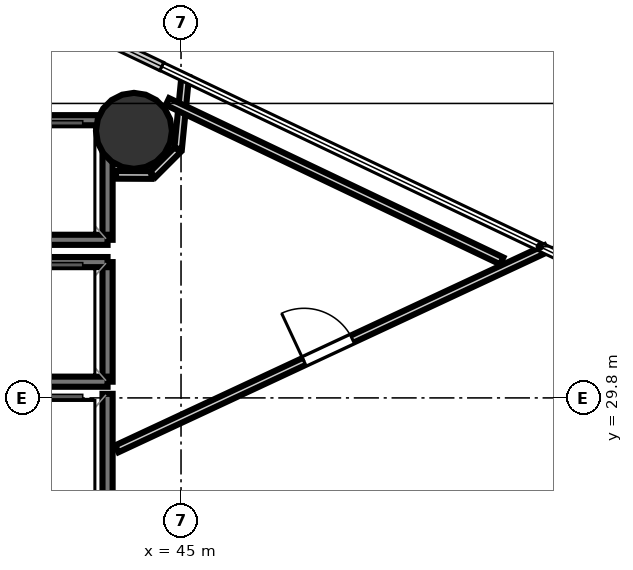
"""IFC4 building model, lengths in metres.
Left out: names, types, materials, properties, quantities, classifications, styles, units other than length and angle.
Written with IfcOpenShell. Run it as: python <this file> out.ifc"""

import sys

from ifc_helpers import new_model, si_unit, direction, frame, frame_2d, origin, origin_2d, place, context, subcontext, project, spatial, rectangle, hollow_circle, extrude, element, fill, save


model = new_model("IFC4")
c1 = context("Model", 3, precision=1e-05, world=origin(), true_north=direction((0.0, 1.0)))
c2 = subcontext(c1, "Body", "Model", "MODEL_VIEW")
j1 = project(units=[si_unit("LENGTHUNIT", "METRE"), si_unit("PLANEANGLEUNIT", "RADIAN")], contexts=[c1])
p1 = place(None, origin())
s1 = spatial("IfcSite", under=j1, at=p1, CompositionType="ELEMENT")
p2 = place(p1, origin())
s2 = spatial("IfcBuilding", under=s1, at=p2, CompositionType="ELEMENT")
p3 = place(p2, frame((0.0, 0.0, 138.5)))
s3 = spatial("IfcBuildingStorey", under=s2, at=p3, CompositionType="ELEMENT", Elevation=138.5)
p4 = place(p3, frame((44.071, 35.07, 0.0), z_axis=(0.0, 0.0, 1.0), x_axis=(1.0, 0.0, 0.0)))
e1 = element("IfcColumn", 1, at=p4, inside=s3, PredefinedType="COLUMN", context=c2, shape_type="SweptSolid", body=[
    extrude(hollow_circle(Radius=0.75, WallThickness=0.036, at=origin_2d()), origin(), (0.0, 0.0, 1.0), 4.6),
])
p5 = place(p3, frame((43.55, 30.12, 0.0), z_axis=(0.0, 0.0, 1.0), x_axis=(0.0, 1.0, 0.0)))
e2 = element("IfcWall", 2, at=p5, inside=s3, PredefinedType="SOLIDWALL", context=c2, shape_type="SweptSolid", body=[
    extrude(rectangle(XDim=2.36, YDim=0.2, at=frame_2d((1.18, 0.0))), origin(), (0.0, 0.0, 1.0), 4.38),
])
for number, where, z_axis, x_axis in (
    (3, (41.45, 32.48, 0.0), (0.0, 0.0, 1.0), (1.0, 0.0, 0.0)),
    (4, (41.45, 30.12, 0.0), (0.0, 0.0, 1.0), (1.0, 0.0, 0.0)),
):
    element("IfcWall", number, at=place(p3, frame(where, z_axis=z_axis, x_axis=x_axis)), inside=s3, PredefinedType="SOLIDWALL", context=c2, shape_type="SweptSolid", body=[
        extrude(rectangle(XDim=2.1, YDim=0.2, at=frame_2d((1.05, 0.0))), origin(), (0.0, 0.0, 1.0), 4.38),
    ])
p6 = place(p3, frame((43.55, 27.52, 0.0), z_axis=(0.0, 0.0, 1.0), x_axis=(0.0, 1.0, 0.0)))
e5 = element("IfcWall", 5, at=p6, inside=s3, PredefinedType="SOLIDWALL", context=c2, shape_type="SweptSolid", body=[
    extrude(rectangle(XDim=2.36, YDim=0.2, at=frame_2d((1.18, 0.0))), origin(), (0.0, 0.0, 1.0), 4.38),
])
p7 = place(p3, frame((43.55, 32.92, 0.0), z_axis=(0.0, 0.0, 1.0), x_axis=(0.0, 1.0, 0.0)))
e6 = element("IfcWall", 6, at=p7, inside=s3, PredefinedType="SOLIDWALL", context=c2, shape_type="SweptSolid", body=[
    extrude(rectangle(XDim=2.36, YDim=0.2, at=frame_2d((1.18, 0.0))), origin(), (0.0, 0.0, 1.0), 4.38),
])
for number, where, z_axis, x_axis in (
    (7, (41.45, 35.28, 0.0), (0.0, 0.0, 1.0), (1.0, 0.0, 0.0)),
    (8, (41.45, 32.92, 0.0), (0.0, 0.0, 1.0), (1.0, 0.0, 0.0)),
):
    element("IfcWall", number, at=place(p3, frame(where, z_axis=z_axis, x_axis=x_axis)), inside=s3, PredefinedType="SOLIDWALL", context=c2, shape_type="SweptSolid", body=[
        extrude(rectangle(XDim=2.1, YDim=0.2, at=frame_2d((1.05, 0.0))), origin(), (0.0, 0.0, 1.0), 4.38),
    ])
p8 = place(p3, frame((43.733, 28.795, 0.0), z_axis=(0.0, 0.0, 1.0), x_axis=(0.906305922987, 0.422622259184, 0.0)))
e9 = element("IfcWall", 9, at=p8, inside=s3, PredefinedType="PARTITIONING", context=c2, shape_type="SweptSolid", body=[
    extrude(rectangle(XDim=9.344, YDim=0.15, at=frame_2d((4.672, 0.0))), origin(), (0.0, 0.0, 1.0), 2.9),
])
p9 = place(p8, frame((4.078, 0.0, 0.0)))
e10 = element("IfcOpeningElement", 10, at=p9, cuts=e9, PredefinedType="OPENING", context=c2, shape_type="SweptSolid", body=[
    extrude(rectangle(XDim=1.05, YDim=2.15, at=frame_2d((0.525, 1.075))), frame((0.0, 0.085, 0.0), z_axis=(0.0, -1.0, 0.0), x_axis=(1.0, 0.0, 0.0)), (0.0, 0.0, 1.0), 0.17),
])
p10 = place(p3, frame((43.717, 34.201, 0.0), z_axis=(0.0, 0.0, 1.0), x_axis=(0.999989798395, -0.004516979631, 0.0)))
e11 = element("IfcWall", 11, at=p10, inside=s3, PredefinedType="PARTITIONING", context=c2, shape_type="SweptSolid", body=[
    extrude(rectangle(XDim=0.703, YDim=0.15, at=frame_2d((0.351, 0.0))), origin(), (0.0, 0.0, 1.0), 2.9),
])
p11 = place(p3, frame((44.441, 34.207, 0.0), z_axis=(0.0, 0.0, 1.0), x_axis=(0.707106781187, 0.707106781187, 0.0)))
e12 = element("IfcWall", 12, at=p11, inside=s3, PredefinedType="PARTITIONING", context=c2, shape_type="SweptSolid", body=[
    extrude(rectangle(XDim=0.696, YDim=0.15, at=frame_2d((0.348, 0.0))), origin(), (0.0, 0.0, 1.0), 2.9),
])
p12 = place(p3, frame((44.943, 34.719, 0.0), z_axis=(0.0, 0.0, 1.0), x_axis=(0.09799656461, 0.995186752989, 0.0)))
e13 = element("IfcWall", 13, at=p12, inside=s3, PredefinedType="PARTITIONING", context=c2, shape_type="SweptSolid", body=[
    extrude(rectangle(XDim=1.427, YDim=0.15, at=frame_2d((0.714, 0.0))), origin(), (0.0, 0.0, 1.0), 2.9),
])
p13 = place(p3, frame((44.732, 35.647, 0.0), z_axis=(0.0, 0.0, 1.0), x_axis=(0.902790723748, -0.430080119414, 0.0)))
e14 = element("IfcWall", 14, at=p13, inside=s3, PredefinedType="PARTITIONING", context=c2, shape_type="SweptSolid", body=[
    extrude(rectangle(XDim=7.308, YDim=0.15, at=frame_2d((3.654, 0.0))), origin(), (0.0, 0.0, 1.0), 2.9),
])
p14 = place(p9, origin())
e15 = element("IfcDoor", 15, at=p14, inside=s3, OperationType="SINGLE_SWING_LEFT", PredefinedType="DOOR", context=c2, shape_type="SweptSolid", body=[
    extrude(rectangle(XDim=1.05, YDim=2.15, at=frame_2d((0.525, 1.075))), frame((0.0, 0.025, 0.0), z_axis=(0.0, -1.0, 0.0), x_axis=(1.0, 0.0, 0.0)), (0.0, 0.0, 1.0), 0.05),
])
fill(e10, e15)
save(model, sys.argv[1])
